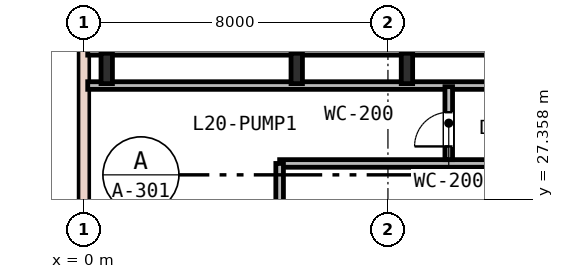
"""IFC4 building model, lengths in metres.
Left out: names, types, materials, properties, quantities, classifications, styles, units other than length and angle.
Written with IfcOpenShell. Run it as: python <this file> out.ifc"""

import sys

from ifc_helpers import new_model, si_unit, direction, frame, frame_2d, origin, origin_2d, place, context, subcontext, project, spatial, rectangle, i_section, extrude, element, fill, save


model = new_model("IFC4")
c1 = context("Model", 3, precision=1e-05, world=origin(), true_north=direction((0.0, 1.0)))
c2 = subcontext(c1, "Body", "Model", "MODEL_VIEW")
j1 = project(units=[si_unit("LENGTHUNIT", "METRE"), si_unit("PLANEANGLEUNIT", "RADIAN")], contexts=[c1])
p1 = place(None, origin())
s1 = spatial("IfcSite", under=j1, at=p1, CompositionType="ELEMENT")
p2 = place(p1, origin())
s2 = spatial("IfcBuilding", under=s1, at=p2, CompositionType="ELEMENT")
p3 = place(p2, frame((0.0, 0.0, 79.8)))
s3 = spatial("IfcBuildingStorey", under=s2, at=p3, CompositionType="ELEMENT", Elevation=79.8)
for number, where, z_axis, x_axis in (
    (1, (5.6, 30.8, 0.0), (0.0, 0.0, 1.0), (1.0, 0.0, 0.0)),
    (2, (8.5, 30.8, 0.0), (0.0, 0.0, 1.0), (1.0, 0.0, 0.0)),
    (3, (0.6, 30.8, 0.0), (0.0, 0.0, 1.0), (1.0, 0.0, 0.0)),
):
    element("IfcColumn", number, at=place(p3, frame(where, z_axis=z_axis, x_axis=x_axis)), inside=s3, PredefinedType="COLUMN", context=c2, shape_type="SweptSolid", body=[
        extrude(i_section(OverallWidth=0.3, OverallDepth=0.8, WebThickness=0.018, FlangeThickness=0.033, FilletRadius=0.03, at=origin_2d()), origin(), (0.0, 0.0, 1.0), 4.8),
    ])
p4 = place(p3, frame((0.0, 44.5, 0.0), z_axis=(0.0, 0.0, 1.0), x_axis=(0.0, -1.0, 0.0)))
e4 = element("IfcWall", 4, at=p4, inside=s3, PredefinedType="STANDARD", context=c2, shape_type="SweptSolid", body=[
    extrude(rectangle(XDim=41.0, YDim=0.25, at=frame_2d((20.5, 0.0))), origin(), (0.0, 0.0, 1.0), 1.15),
])
for number, where, z_axis, x_axis in (
    (5, (0.1, 30.35, 0.0), (0.0, 0.0, 1.0), (1.0, 0.0, 0.0)),
    (6, (0.1, 31.25, 0.0), (0.0, 0.0, 1.0), (1.0, 0.0, 0.0)),
):
    element("IfcWall", number, at=place(p3, frame(where, z_axis=z_axis, x_axis=x_axis)), inside=s3, PredefinedType="PARTITIONING", context=c2, shape_type="SweptSolid", body=[
        extrude(rectangle(XDim=15.8, YDim=0.2, at=frame_2d((7.9, 0.0))), origin(), (0.0, 0.0, 1.0), 3.94),
    ])
p5 = place(p3, frame((5.15, 28.3, 0.0), z_axis=(0.0, 0.0, 1.0), x_axis=(1.0, 0.0, 0.0)))
e7 = element("IfcWall", 7, at=p5, inside=s3, PredefinedType="PARTITIONING", context=c2, shape_type="SweptSolid", body=[
    extrude(rectangle(XDim=6.35, YDim=0.2, at=frame_2d((3.175, 0.0))), origin(), (0.0, 0.0, 1.0), 3.94),
])
p6 = place(p3, frame((5.15, 10.5, 0.0), z_axis=(0.0, 0.0, 1.0), x_axis=(0.0, 1.0, 0.0)))
e8 = element("IfcWall", 8, at=p6, inside=s3, PredefinedType="PARTITIONING", context=c2, shape_type="SweptSolid", body=[
    extrude(rectangle(XDim=17.8, YDim=0.2, at=frame_2d((8.9, 0.0))), origin(), (0.0, 0.0, 1.0), 3.94),
])
p7 = place(p6, frame((3.6, 0.0, 0.0)))
e9 = element("IfcOpeningElement", 9, at=p7, cuts=e8, PredefinedType="OPENING", context=c2, shape_type="SweptSolid", body=[
    extrude(rectangle(XDim=0.9, YDim=2.15, at=frame_2d((0.45, 1.075))), frame((0.0, 0.11, 0.0), z_axis=(0.0, -1.0, 0.0), x_axis=(1.0, 0.0, 0.0)), (0.0, 0.0, 1.0), 0.22),
])
p8 = place(p3, frame((9.6, 28.4, 0.0), z_axis=(0.0, 0.0, 1.0), x_axis=(0.0, 1.0, 0.0)))
e10 = element("IfcWall", 10, at=p8, inside=s3, PredefinedType="PARTITIONING", context=c2, shape_type="SweptSolid", body=[
    extrude(rectangle(XDim=1.92, YDim=0.2, at=frame_2d((0.96, 0.0))), origin(), (0.0, 0.0, 1.0), 3.94),
])
p9 = place(p8, frame((0.348, 0.0, 0.0)))
e11 = element("IfcOpeningElement", 11, at=p9, cuts=e10, PredefinedType="OPENING", context=c2, shape_type="SweptSolid", body=[
    extrude(rectangle(XDim=0.9, YDim=2.15, at=frame_2d((0.45, 1.075))), frame((0.0, 0.11, 0.0), z_axis=(0.0, -1.0, 0.0), x_axis=(1.0, 0.0, 0.0)), (0.0, 0.0, 1.0), 0.22),
])
p10 = place(p9, origin())
e12 = element("IfcDoor", 12, at=p10, inside=s3, OperationType="SINGLE_SWING_LEFT", PredefinedType="DOOR", context=c2, shape_type="SweptSolid", body=[
    extrude(rectangle(XDim=0.9, YDim=2.15, at=frame_2d((0.45, 1.075))), frame((0.0, 0.025, 0.0), z_axis=(0.0, -1.0, 0.0), x_axis=(1.0, 0.0, 0.0)), (0.0, 0.0, 1.0), 0.05),
])
fill(e11, e12)
save(model, sys.argv[1])
